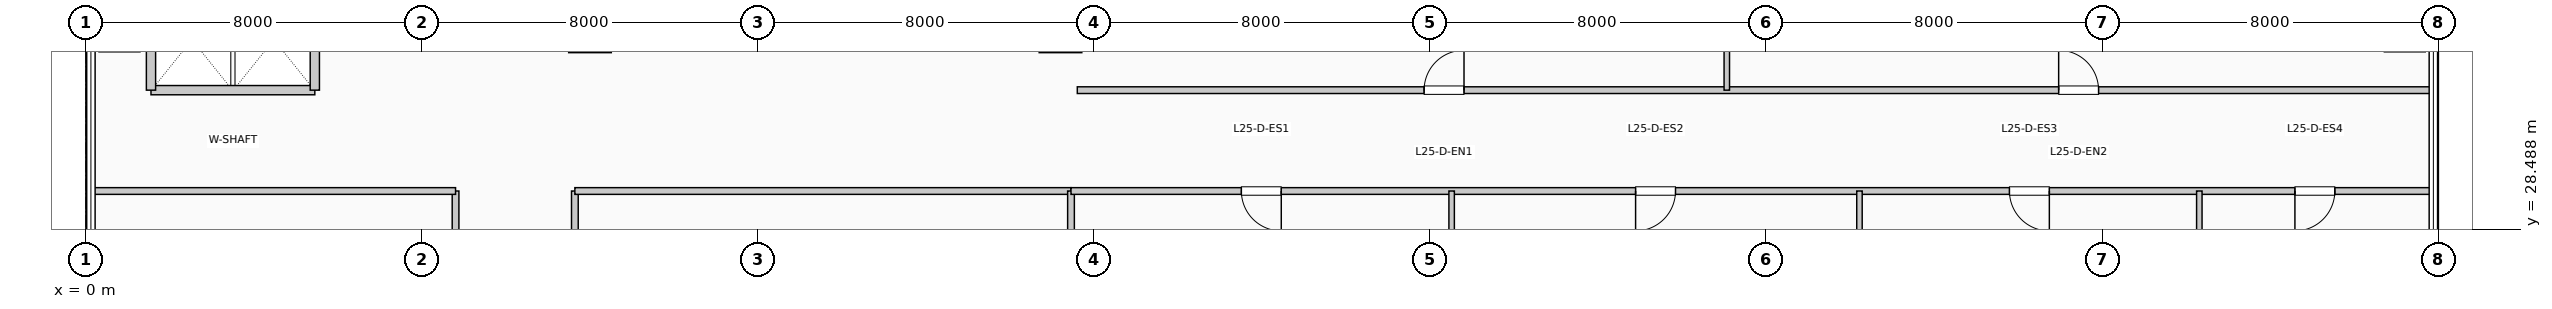
"""IFC4 building model, lengths in metres.
Left out: names, types, materials, properties, quantities, classifications, styles, units other than length and angle.
Written with IfcOpenShell. Run it as: python <this file> out.ifc"""

import sys

from ifc_helpers import new_model, si_unit, direction, frame, frame_2d, origin, place, context, subcontext, project, spatial, rectangle, extrude, element, fill, save


model = new_model("IFC4")
c1 = context("Model", 3, precision=1e-05, world=origin(), true_north=direction((0.0, 1.0)))
c2 = subcontext(c1, "Body", "Model", "MODEL_VIEW")
j1 = project(units=[si_unit("LENGTHUNIT", "METRE"), si_unit("PLANEANGLEUNIT", "RADIAN")], contexts=[c1])
p1 = place(None, origin())
s1 = spatial("IfcSite", under=j1, at=p1, CompositionType="ELEMENT")
p2 = place(p1, origin())
s2 = spatial("IfcBuilding", under=s1, at=p2, CompositionType="ELEMENT")
p3 = place(p2, frame((0.0, 0.0, 106.59)))
s3 = spatial("IfcBuildingStorey", under=s2, at=p3, CompositionType="ELEMENT", Elevation=106.59)
p4 = place(p3, frame((1.55, 31.8, 0.0), z_axis=(0.0, 0.0, 1.0), x_axis=(1.0, 0.0, 0.0)))
e1 = element("IfcWall", 1, at=p4, inside=s3, PredefinedType="PARTITIONING", context=c2, shape_type="SweptSolid", body=[
    extrude(rectangle(XDim=3.9, YDim=0.22, at=frame_2d((1.95, 0.0))), origin(), (0.0, 0.0, 1.0), 3.71),
])
for number, where, z_axis, x_axis in (
    (2, (1.55, 31.8, 0.0), (0.0, 0.0, 1.0), (0.0, 1.0, 0.0)),
    (3, (5.45, 31.8, 0.0), (0.0, 0.0, 1.0), (0.0, 1.0, 0.0)),
):
    element("IfcWall", number, at=place(p3, frame(where, z_axis=z_axis, x_axis=x_axis)), inside=s3, PredefinedType="PARTITIONING", context=c2, shape_type="SweptSolid", body=[
        extrude(rectangle(XDim=2.38, YDim=0.22, at=frame_2d((1.19, 0.0))), origin(), (0.0, 0.0, 1.0), 3.71),
    ])
p5 = place(p3, frame((8.8, 6.4, 0.0), z_axis=(0.0, 0.0, 1.0), x_axis=(0.0, 1.0, 0.0)))
e4 = element("IfcWall", 4, at=p5, inside=s3, PredefinedType="PARTITIONING", context=c2, shape_type="SweptSolid", body=[
    extrude(rectangle(XDim=23.0, YDim=0.16, at=frame_2d((11.5, 0.0))), origin(), (0.0, 0.0, 1.0), 3.71),
])
p6 = place(p5, frame((3.235, 0.0, 0.0), z_axis=(0.0, 0.0, 1.0), x_axis=(-1.0, 0.0, 0.0)))
e5 = element("IfcOpeningElement", 5, at=p6, cuts=e4, PredefinedType="OPENING", context=c2, shape_type="SweptSolid", body=[
    extrude(rectangle(XDim=0.95, YDim=2.15, at=frame_2d((0.475, 1.075))), frame((0.0, 0.09, 0.0), z_axis=(0.0, -1.0, 0.0), x_axis=(1.0, 0.0, 0.0)), (0.0, 0.0, 1.0), 0.18),
])
p7 = place(p5, frame((9.215, 0.0, 0.0), z_axis=(0.0, 0.0, 1.0), x_axis=(-1.0, 0.0, 0.0)))
e6 = element("IfcOpeningElement", 6, at=p7, cuts=e4, PredefinedType="OPENING", context=c2, shape_type="SweptSolid", body=[
    extrude(rectangle(XDim=0.95, YDim=2.15, at=frame_2d((0.475, 1.075))), frame((0.0, 0.09, 0.0), z_axis=(0.0, -1.0, 0.0), x_axis=(1.0, 0.0, 0.0)), (0.0, 0.0, 1.0), 0.18),
])
p8 = place(p5, frame((15.425, 0.0, 0.0), z_axis=(0.0, 0.0, 1.0), x_axis=(-1.0, 0.0, 0.0)))
e7 = element("IfcOpeningElement", 7, at=p8, cuts=e4, PredefinedType="OPENING", context=c2, shape_type="SweptSolid", body=[
    extrude(rectangle(XDim=0.95, YDim=2.15, at=frame_2d((0.475, 1.075))), frame((0.0, 0.09, 0.0), z_axis=(0.0, -1.0, 0.0), x_axis=(1.0, 0.0, 0.0)), (0.0, 0.0, 1.0), 0.18),
])
p9 = place(p5, frame((20.945, 0.0, 0.0), z_axis=(0.0, 0.0, 1.0), x_axis=(-1.0, 0.0, 0.0)))
e8 = element("IfcOpeningElement", 8, at=p9, cuts=e4, PredefinedType="OPENING", context=c2, shape_type="SweptSolid", body=[
    extrude(rectangle(XDim=0.95, YDim=2.15, at=frame_2d((0.475, 1.075))), frame((0.0, 0.09, 0.0), z_axis=(0.0, -1.0, 0.0), x_axis=(1.0, 0.0, 0.0)), (0.0, 0.0, 1.0), 0.18),
])
p10 = place(p3, frame((11.64, 6.4, 0.0), z_axis=(0.0, 0.0, 1.0), x_axis=(0.0, 1.0, 0.0)))
e9 = element("IfcWall", 9, at=p10, inside=s3, PredefinedType="PARTITIONING", context=c2, shape_type="SweptSolid", body=[
    extrude(rectangle(XDim=23.0, YDim=0.16, at=frame_2d((11.5, 0.0))), origin(), (0.0, 0.0, 1.0), 2.995),
])
p11 = place(p10, frame((4.275, 0.0, 0.0)))
e10 = element("IfcOpeningElement", 10, at=p11, cuts=e9, PredefinedType="OPENING", context=c2, shape_type="SweptSolid", body=[
    extrude(rectangle(XDim=0.95, YDim=2.15, at=frame_2d((0.475, 1.075))), frame((0.0, 0.09, 0.0), z_axis=(0.0, -1.0, 0.0), x_axis=(1.0, 0.0, 0.0)), (0.0, 0.0, 1.0), 0.18),
])
p12 = place(p10, frame((17.775, 0.0, 0.0)))
e11 = element("IfcOpeningElement", 11, at=p12, cuts=e9, PredefinedType="OPENING", context=c2, shape_type="SweptSolid", body=[
    extrude(rectangle(XDim=0.95, YDim=2.15, at=frame_2d((0.475, 1.075))), frame((0.0, 0.09, 0.0), z_axis=(0.0, -1.0, 0.0), x_axis=(1.0, 0.0, 0.0)), (0.0, 0.0, 1.0), 0.18),
])
p13 = place(p3, frame((0.19, 29.4, 0.0), z_axis=(0.0, 0.0, 1.0), x_axis=(1.0, 0.0, 0.0)))
e12 = element("IfcWall", 12, at=p13, inside=s3, PredefinedType="PARTITIONING", context=c2, shape_type="SweptSolid", body=[
    extrude(rectangle(XDim=8.61, YDim=0.16, at=frame_2d((4.305, 0.0))), origin(), (0.0, 0.0, 1.0), 3.365),
])
p14 = place(p3, frame((11.64, 29.4, 0.0), z_axis=(0.0, 0.0, 1.0), x_axis=(1.0, 0.0, 0.0)))
e13 = element("IfcWall", 13, at=p14, inside=s3, PredefinedType="PARTITIONING", context=c2, shape_type="SweptSolid", body=[
    extrude(rectangle(XDim=11.81, YDim=0.16, at=frame_2d((5.905, 0.0))), origin(), (0.0, 0.0, 1.0), 3.71),
])
p15 = place(p3, frame((23.45, 0.19, 0.0), z_axis=(0.0, 0.0, 1.0), x_axis=(0.0, 1.0, 0.0)))
e14 = element("IfcWall", 14, at=p15, inside=s3, PredefinedType="PARTITIONING", context=c2, shape_type="SweptSolid", body=[
    extrude(rectangle(XDim=29.21, YDim=0.16, at=frame_2d((14.605, 0.0))), origin(), (0.0, 0.0, 1.0), 2.995),
])
p16 = place(p3, frame((23.45, 29.4, 0.0), z_axis=(0.0, 0.0, 1.0), x_axis=(1.0, 0.0, 0.0)))
e15 = element("IfcWall", 15, at=p16, inside=s3, PredefinedType="PARTITIONING", context=c2, shape_type="SweptSolid", body=[
    extrude(rectangle(XDim=32.36, YDim=0.16, at=frame_2d((16.18, 0.0))), origin(), (0.0, 0.0, 1.0), 3.365),
])
p17 = place(p16, frame((5.005, 0.0, 0.0), z_axis=(0.0, 0.0, 1.0), x_axis=(-1.0, 0.0, 0.0)))
e16 = element("IfcOpeningElement", 16, at=p17, cuts=e15, PredefinedType="OPENING", context=c2, shape_type="SweptSolid", body=[
    extrude(rectangle(XDim=0.95, YDim=2.15, at=frame_2d((0.475, 1.075))), frame((0.0, 0.09, 0.0), z_axis=(0.0, -1.0, 0.0), x_axis=(1.0, 0.0, 0.0)), (0.0, 0.0, 1.0), 0.18),
])
p18 = place(p16, frame((14.39, 0.0, 0.0), z_axis=(0.0, 0.0, 1.0), x_axis=(-1.0, 0.0, 0.0)))
e17 = element("IfcOpeningElement", 17, at=p18, cuts=e15, PredefinedType="OPENING", context=c2, shape_type="SweptSolid", body=[
    extrude(rectangle(XDim=0.95, YDim=2.15, at=frame_2d((0.475, 1.075))), frame((0.0, 0.09, 0.0), z_axis=(0.0, -1.0, 0.0), x_axis=(1.0, 0.0, 0.0)), (0.0, 0.0, 1.0), 0.18),
])
p19 = place(p16, frame((23.289, 0.0, 0.0), z_axis=(0.0, 0.0, 1.0), x_axis=(-1.0, 0.0, 0.0)))
e18 = element("IfcOpeningElement", 18, at=p19, cuts=e15, PredefinedType="OPENING", context=c2, shape_type="SweptSolid", body=[
    extrude(rectangle(XDim=0.95, YDim=2.15, at=frame_2d((0.475, 1.075))), frame((0.0, 0.09, 0.0), z_axis=(0.0, -1.0, 0.0), x_axis=(1.0, 0.0, 0.0)), (0.0, 0.0, 1.0), 0.18),
])
p20 = place(p16, frame((30.084, 0.0, 0.0), z_axis=(0.0, 0.0, 1.0), x_axis=(-1.0, 0.0, 0.0)))
e19 = element("IfcOpeningElement", 19, at=p20, cuts=e15, PredefinedType="OPENING", context=c2, shape_type="SweptSolid", body=[
    extrude(rectangle(XDim=0.95, YDim=2.15, at=frame_2d((0.475, 1.075))), frame((0.0, 0.09, 0.0), z_axis=(0.0, -1.0, 0.0), x_axis=(1.0, 0.0, 0.0)), (0.0, 0.0, 1.0), 0.18),
])
p21 = place(p3, frame((23.6, 31.8, 0.0), z_axis=(0.0, 0.0, 1.0), x_axis=(1.0, 0.0, 0.0)))
e20 = element("IfcWall", 20, at=p21, inside=s3, PredefinedType="PARTITIONING", context=c2, shape_type="SweptSolid", body=[
    extrude(rectangle(XDim=32.21, YDim=0.16, at=frame_2d((16.105, 0.0))), origin(), (0.0, 0.0, 1.0), 3.71),
])
p22 = place(p21, frame((8.255, 0.0, 0.0)))
e21 = element("IfcOpeningElement", 21, at=p22, cuts=e20, PredefinedType="OPENING", context=c2, shape_type="SweptSolid", body=[
    extrude(rectangle(XDim=0.95, YDim=2.15, at=frame_2d((0.475, 1.075))), frame((0.0, 0.09, 0.0), z_axis=(0.0, -1.0, 0.0), x_axis=(1.0, 0.0, 0.0)), (0.0, 0.0, 1.0), 0.18),
])
p23 = place(p21, frame((23.36, 0.0, 0.0)))
e22 = element("IfcOpeningElement", 22, at=p23, cuts=e20, PredefinedType="OPENING", context=c2, shape_type="SweptSolid", body=[
    extrude(rectangle(XDim=0.95, YDim=2.15, at=frame_2d((0.475, 1.075))), frame((0.0, 0.09, 0.0), z_axis=(0.0, -1.0, 0.0), x_axis=(1.0, 0.0, 0.0)), (0.0, 0.0, 1.0), 0.18),
])
for number, where, z_axis, x_axis in (
    (23, (32.511, 18.19, 0.0), (0.0, 0.0, 1.0), (0.0, 1.0, 0.0)),
    (24, (42.219, 18.19, 0.0), (0.0, 0.0, 1.0), (0.0, 1.0, 0.0)),
    (25, (50.309, 18.19, 0.0), (0.0, 0.0, 1.0), (0.0, 1.0, 0.0)),
):
    element("IfcWall", number, at=place(p3, frame(where, z_axis=z_axis, x_axis=x_axis)), inside=s3, PredefinedType="PARTITIONING", context=c2, shape_type="SweptSolid", body=[
        extrude(rectangle(XDim=11.21, YDim=0.13, at=frame_2d((5.605, 0.0))), origin(), (0.0, 0.0, 1.0), 3.71),
    ])
p24 = place(p3, frame((39.061, 31.8, 0.0), z_axis=(0.0, 0.0, 1.0), x_axis=(0.0, 1.0, 0.0)))
e26 = element("IfcWall", 26, at=p24, inside=s3, PredefinedType="PARTITIONING", context=c2, shape_type="SweptSolid", body=[
    extrude(rectangle(XDim=14.01, YDim=0.13, at=frame_2d((7.005, 0.0))), origin(), (0.0, 0.0, 1.0), 3.71),
])
p25 = place(p17, origin())
e27 = element("IfcDoor", 27, at=p25, inside=s3, OperationType="SINGLE_SWING_RIGHT", PredefinedType="DOOR", context=c2, shape_type="SweptSolid", body=[
    extrude(rectangle(XDim=0.95, YDim=2.15, at=frame_2d((0.475, 1.075))), frame((0.0, 0.025, 0.0), z_axis=(0.0, -1.0, 0.0), x_axis=(1.0, 0.0, 0.0)), (0.0, 0.0, 1.0), 0.05),
])
fill(e16, e27)
p26 = place(p18, origin())
e28 = element("IfcDoor", 28, at=p26, inside=s3, OperationType="SINGLE_SWING_LEFT", PredefinedType="DOOR", context=c2, shape_type="SweptSolid", body=[
    extrude(rectangle(XDim=0.95, YDim=2.15, at=frame_2d((0.475, 1.075))), frame((0.0, 0.025, 0.0), z_axis=(0.0, -1.0, 0.0), x_axis=(1.0, 0.0, 0.0)), (0.0, 0.0, 1.0), 0.05),
])
fill(e17, e28)
p27 = place(p19, origin())
e29 = element("IfcDoor", 29, at=p27, inside=s3, OperationType="SINGLE_SWING_RIGHT", PredefinedType="DOOR", context=c2, shape_type="SweptSolid", body=[
    extrude(rectangle(XDim=0.95, YDim=2.15, at=frame_2d((0.475, 1.075))), frame((0.0, 0.025, 0.0), z_axis=(0.0, -1.0, 0.0), x_axis=(1.0, 0.0, 0.0)), (0.0, 0.0, 1.0), 0.05),
])
fill(e18, e29)
p28 = place(p20, origin())
e30 = element("IfcDoor", 30, at=p28, inside=s3, OperationType="SINGLE_SWING_LEFT", PredefinedType="DOOR", context=c2, shape_type="SweptSolid", body=[
    extrude(rectangle(XDim=0.95, YDim=2.15, at=frame_2d((0.475, 1.075))), frame((0.0, 0.025, 0.0), z_axis=(0.0, -1.0, 0.0), x_axis=(1.0, 0.0, 0.0)), (0.0, 0.0, 1.0), 0.05),
])
fill(e19, e30)
p29 = place(p22, origin())
e31 = element("IfcDoor", 31, at=p29, inside=s3, OperationType="SINGLE_SWING_RIGHT", PredefinedType="DOOR", context=c2, shape_type="SweptSolid", body=[
    extrude(rectangle(XDim=0.95, YDim=2.15, at=frame_2d((0.475, 1.075))), frame((0.0, 0.025, 0.0), z_axis=(0.0, -1.0, 0.0), x_axis=(1.0, 0.0, 0.0)), (0.0, 0.0, 1.0), 0.05),
])
fill(e21, e31)
p30 = place(p23, origin())
e32 = element("IfcDoor", 32, at=p30, inside=s3, OperationType="SINGLE_SWING_LEFT", PredefinedType="DOOR", context=c2, shape_type="SweptSolid", body=[
    extrude(rectangle(XDim=0.95, YDim=2.15, at=frame_2d((0.475, 1.075))), frame((0.0, 0.025, 0.0), z_axis=(0.0, -1.0, 0.0), x_axis=(1.0, 0.0, 0.0)), (0.0, 0.0, 1.0), 0.05),
])
fill(e22, e32)
save(model, sys.argv[1])
